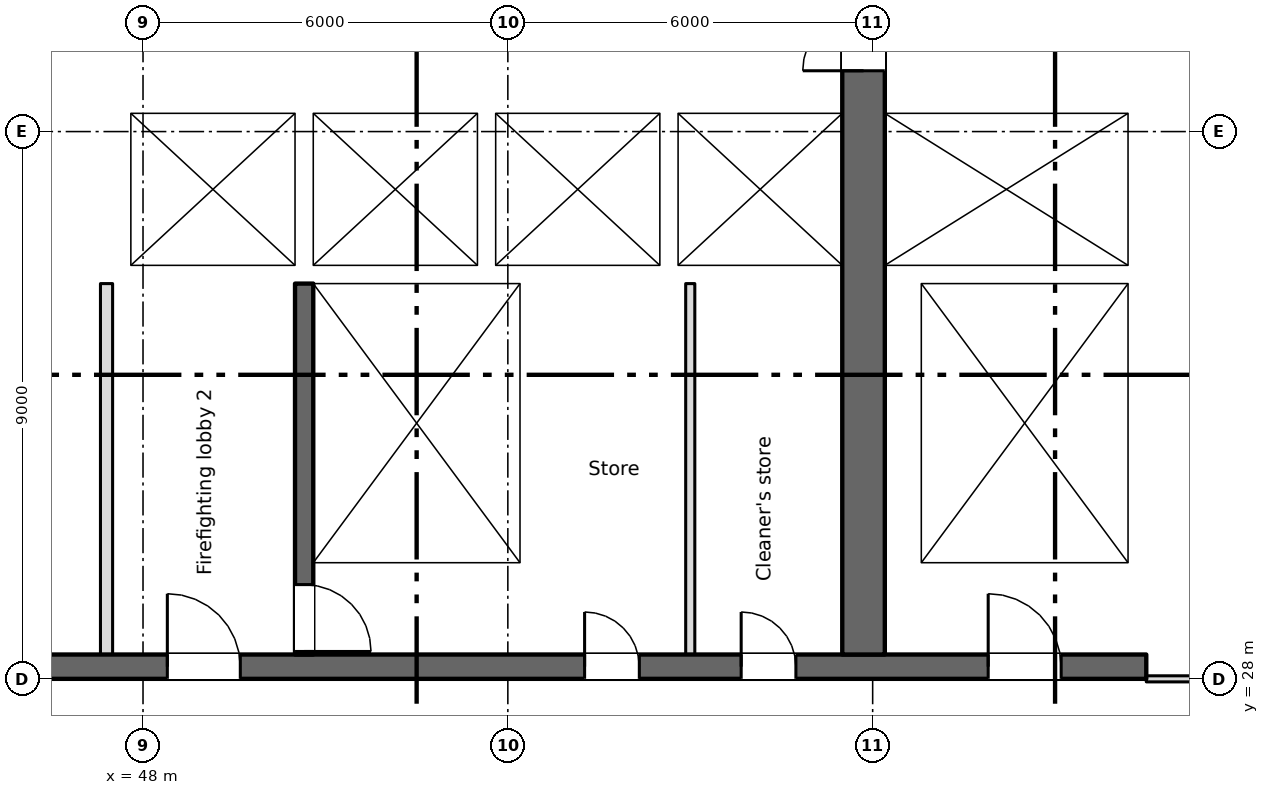
"""IFC4 building model, lengths in metres.
Left out: names, types, materials, properties, quantities, classifications, styles, units other than length and angle.
Written with IfcOpenShell. Run it as: python <this file> out.ifc"""

import sys

from ifc_helpers import new_model, si_unit, direction, frame, frame_2d, origin, place, context, subcontext, project, spatial, rectangle, extrude, element, fill, save


model = new_model("IFC4")
c1 = context("Model", 3, precision=1e-05, world=origin(), true_north=direction((0.0, 1.0)))
c2 = subcontext(c1, "Body", "Model", "MODEL_VIEW")
j1 = project(units=[si_unit("LENGTHUNIT", "METRE"), si_unit("PLANEANGLEUNIT", "RADIAN")], contexts=[c1])
p1 = place(None, origin())
s1 = spatial("IfcSite", under=j1, at=p1, CompositionType="ELEMENT")
p2 = place(p1, origin())
s2 = spatial("IfcBuilding", under=s1, at=p2, CompositionType="ELEMENT")
p3 = place(p2, frame((0.0, 0.0, 193.0)))
s3 = spatial("IfcBuildingStorey", under=s2, at=p3, CompositionType="ELEMENT", Elevation=193.0)
p4 = place(p3, frame((6.6, 28.2, 0.0), z_axis=(0.0, 0.0, 1.0), x_axis=(1.0, 0.0, 0.0)))
e1 = element("IfcWall", 1, at=p4, inside=s3, PredefinedType="SHEAR", context=c2, shape_type="SweptSolid", body=[
    extrude(rectangle(XDim=57.9, YDim=0.4, at=frame_2d((28.95, 0.0))), origin(), (0.0, 0.0, 1.0), 3.35),
])
p5 = place(p4, frame((13.95, 0.0, 0.0)))
e2 = element("IfcOpeningElement", 2, at=p5, cuts=e1, PredefinedType="OPENING", context=c2, shape_type="SweptSolid", body=[
    extrude(rectangle(XDim=0.9, YDim=2.1, at=frame_2d((0.45, 1.05))), frame((0.0, 0.21, 0.0), z_axis=(0.0, -1.0, 0.0), x_axis=(1.0, 0.0, 0.0)), (0.0, 0.0, 1.0), 0.42),
])
p6 = place(p4, frame((48.663, 0.0, 0.0)))
e3 = element("IfcOpeningElement", 3, at=p6, cuts=e1, PredefinedType="OPENING", context=c2, shape_type="SweptSolid", body=[
    extrude(rectangle(XDim=0.9, YDim=2.1, at=frame_2d((0.45, 1.05))), frame((0.0, 0.21, 0.0), z_axis=(0.0, -1.0, 0.0), x_axis=(1.0, 0.0, 0.0)), (0.0, 0.0, 1.0), 0.42),
])
p7 = place(p4, frame((51.238, 0.0, 0.0)))
e4 = element("IfcOpeningElement", 4, at=p7, cuts=e1, PredefinedType="OPENING", context=c2, shape_type="SweptSolid", body=[
    extrude(rectangle(XDim=0.9, YDim=2.1, at=frame_2d((0.45, 1.05))), frame((0.0, 0.21, 0.0), z_axis=(0.0, -1.0, 0.0), x_axis=(1.0, 0.0, 0.0)), (0.0, 0.0, 1.0), 0.42),
])
p8 = place(p4, frame((1.45, 0.0, 0.0)))
e5 = element("IfcOpeningElement", 5, at=p8, cuts=e1, PredefinedType="OPENING", context=c2, shape_type="SweptSolid", body=[
    extrude(rectangle(XDim=0.9, YDim=2.1, at=frame_2d((0.45, 1.05))), frame((0.0, 0.21, 0.0), z_axis=(0.0, -1.0, 0.0), x_axis=(1.0, 0.0, 0.0)), (0.0, 0.0, 1.0), 0.42),
])
p9 = place(p4, frame((4.8, 0.0, 0.0)))
e6 = element("IfcOpeningElement", 6, at=p9, cuts=e1, PredefinedType="OPENING", context=c2, shape_type="SweptSolid", body=[
    extrude(rectangle(XDim=1.2, YDim=2.1, at=frame_2d((0.6, 1.05))), frame((0.0, 0.21, 0.0), z_axis=(0.0, -1.0, 0.0), x_axis=(1.0, 0.0, 0.0)), (0.0, 0.0, 1.0), 0.42),
])
p10 = place(p4, frame((31.8, 0.0, 0.0)))
e7 = element("IfcOpeningElement", 7, at=p10, cuts=e1, PredefinedType="OPENING", context=c2, shape_type="SweptSolid", body=[
    extrude(rectangle(XDim=1.2, YDim=2.1, at=frame_2d((0.6, 1.05))), frame((0.0, 0.21, 0.0), z_axis=(0.0, -1.0, 0.0), x_axis=(1.0, 0.0, 0.0)), (0.0, 0.0, 1.0), 0.42),
])
p11 = place(p4, frame((55.3, 0.0, 0.0)))
e8 = element("IfcOpeningElement", 8, at=p11, cuts=e1, PredefinedType="OPENING", context=c2, shape_type="SweptSolid", body=[
    extrude(rectangle(XDim=1.2, YDim=2.1, at=frame_2d((0.6, 1.05))), frame((0.0, 0.21, 0.0), z_axis=(0.0, -1.0, 0.0), x_axis=(1.0, 0.0, 0.0)), (0.0, 0.0, 1.0), 0.42),
])
p12 = place(p4, frame((21.8, 0.0, 0.0)))
e9 = element("IfcOpeningElement", 9, at=p12, cuts=e1, PredefinedType="OPENING", context=c2, shape_type="SweptSolid", body=[
    extrude(rectangle(XDim=1.2, YDim=2.1, at=frame_2d((0.6, 1.05))), frame((0.0, 0.21, 0.0), z_axis=(0.0, -1.0, 0.0), x_axis=(1.0, 0.0, 0.0)), (0.0, 0.0, 1.0), 0.42),
])
p13 = place(p4, frame((41.8, 0.0, 0.0)))
e10 = element("IfcOpeningElement", 10, at=p13, cuts=e1, PredefinedType="OPENING", context=c2, shape_type="SweptSolid", body=[
    extrude(rectangle(XDim=1.2, YDim=2.1, at=frame_2d((0.6, 1.05))), frame((0.0, 0.21, 0.0), z_axis=(0.0, -1.0, 0.0), x_axis=(1.0, 0.0, 0.0)), (0.0, 0.0, 1.0), 0.42),
])
p14 = place(p4, frame((24.95, 0.0, 0.0)))
e11 = element("IfcOpeningElement", 11, at=p14, cuts=e1, PredefinedType="OPENING", context=c2, shape_type="SweptSolid", body=[
    extrude(rectangle(XDim=2.4, YDim=2.1, at=frame_2d((1.2, 1.05))), frame((0.0, 0.21, 0.0), z_axis=(0.0, -1.0, 0.0), x_axis=(1.0, 0.0, 0.0)), (0.0, 0.0, 1.0), 0.42),
])
p15 = place(p4, frame((37.45, 0.0, 0.0)))
e12 = element("IfcOpeningElement", 12, at=p15, cuts=e1, PredefinedType="OPENING", context=c2, shape_type="SweptSolid", body=[
    extrude(rectangle(XDim=2.4, YDim=2.1, at=frame_2d((1.2, 1.05))), frame((0.0, 0.21, 0.0), z_axis=(0.0, -1.0, 0.0), x_axis=(1.0, 0.0, 0.0)), (0.0, 0.0, 1.0), 0.42),
])
p16 = place(p4, frame((8.1, 0.0, 0.0)))
e13 = element("IfcOpeningElement", 13, at=p16, cuts=e1, PredefinedType="OPENING", context=c2, shape_type="SweptSolid", body=[
    extrude(rectangle(XDim=2.4, YDim=2.1, at=frame_2d((1.2, 1.05))), frame((0.0, 0.21, 0.0), z_axis=(0.0, -1.0, 0.0), x_axis=(1.0, 0.0, 0.0)), (0.0, 0.0, 1.0), 0.42),
])
p17 = place(p4, frame((28.95, 0.0, 0.0)))
e14 = element("IfcOpeningElement", 14, at=p17, cuts=e1, PredefinedType="OPENING", context=c2, shape_type="SweptSolid", body=[
    extrude(rectangle(XDim=0.9, YDim=2.1, at=frame_2d((0.45, 1.05))), frame((0.0, 0.21, 0.0), z_axis=(0.0, -1.0, 0.0), x_axis=(1.0, 0.0, 0.0)), (0.0, 0.0, 1.0), 0.42),
])
p18 = place(p4, frame((34.95, 0.0, 0.0)))
e15 = element("IfcOpeningElement", 15, at=p18, cuts=e1, PredefinedType="OPENING", context=c2, shape_type="SweptSolid", body=[
    extrude(rectangle(XDim=0.9, YDim=2.1, at=frame_2d((0.45, 1.05))), frame((0.0, 0.21, 0.0), z_axis=(0.0, -1.0, 0.0), x_axis=(1.0, 0.0, 0.0)), (0.0, 0.0, 1.0), 0.42),
])
p19 = place(p3, frame((64.35, 34.8, 0.0), z_axis=(0.0, 0.0, 1.0), x_axis=(0.0, 1.0, 0.0)))
e16 = element("IfcWall", 16, at=p19, inside=s3, PredefinedType="SHEAR", context=c2, shape_type="SweptSolid", body=[
    extrude(rectangle(XDim=10.5, YDim=0.3, at=frame_2d((5.25, 0.0))), origin(), (0.0, 0.0, 1.0), 3.35),
])
p20 = place(p3, frame((59.85, 28.4, 0.0), z_axis=(0.0, 0.0, 1.0), x_axis=(0.0, 1.0, 0.0)))
e17 = element("IfcWall", 17, at=p20, inside=s3, PredefinedType="SHEAR", context=c2, shape_type="SweptSolid", body=[
    extrude(rectangle(XDim=16.9, YDim=0.7, at=frame_2d((8.45, 0.0))), origin(), (0.0, 0.0, 1.0), 3.35),
])
p21 = place(p20, frame((9.6, 0.0, 0.0)))
e18 = element("IfcOpeningElement", 18, at=p21, cuts=e17, PredefinedType="OPENING", context=c2, shape_type="SweptSolid", body=[
    extrude(rectangle(XDim=2.0, YDim=2.1, at=frame_2d((1.0, 1.05))), frame((0.0, 0.36, 0.0), z_axis=(0.0, -1.0, 0.0), x_axis=(1.0, 0.0, 0.0)), (0.0, 0.0, 1.0), 0.72),
])
p22 = place(p20, frame((15.4, 0.0, 0.0)))
e19 = element("IfcOpeningElement", 19, at=p22, cuts=e17, PredefinedType="OPENING", context=c2, shape_type="SweptSolid", body=[
    extrude(rectangle(XDim=1.2, YDim=2.1, at=frame_2d((0.6, 1.05))), frame((0.0, 0.36, 0.0), z_axis=(0.0, -1.0, 0.0), x_axis=(1.0, 0.0, 0.0)), (0.0, 0.0, 1.0), 0.72),
])
p23 = place(p3, frame((50.65, 34.5, 0.0), z_axis=(0.0, 0.0, 1.0), x_axis=(0.0, -1.0, 0.0)))
e20 = element("IfcWall", 20, at=p23, inside=s3, PredefinedType="SHEAR", context=c2, shape_type="SweptSolid", body=[
    extrude(rectangle(XDim=6.1, YDim=0.3, at=frame_2d((3.05, 0.0))), origin(), (0.0, 0.0, 1.0), 3.35),
])
p24 = place(p23, frame((4.95, 0.0, 0.0)))
e21 = element("IfcOpeningElement", 21, at=p24, cuts=e20, PredefinedType="OPENING", context=c2, shape_type="SweptSolid", body=[
    extrude(rectangle(XDim=1.1, YDim=2.1, at=frame_2d((0.55, 1.05))), frame((0.0, 0.16, 0.0), z_axis=(0.0, -1.0, 0.0), x_axis=(1.0, 0.0, 0.0)), (0.0, 0.0, 1.0), 0.32),
])
p25 = place(p3, frame((54.35, 28.4, 0.0), z_axis=(0.0, 0.0, 1.0), x_axis=(0.0, 1.0, 0.0)))
e22 = element("IfcWall", 22, at=p25, inside=s3, PredefinedType="SHEAR", context=c2, shape_type="SweptSolid", body=[
    extrude(rectangle(XDim=6.1, YDim=0.3, at=frame_2d((3.05, 0.0))), origin(), (0.0, 0.0, 1.0), 3.35),
])
p26 = place(p3, frame((60.5, 28.4, 0.0), z_axis=(0.0, 0.0, 1.0), x_axis=(0.0, 1.0, 0.0)))
e23 = element("IfcWall", 23, at=p26, inside=s3, PredefinedType="SHEAR", context=c2, shape_type="SweptSolid", body=[
    extrude(rectangle(XDim=6.1, YDim=0.6, at=frame_2d((3.05, 0.0))), origin(), (0.0, 0.0, 1.0), 3.35),
])
p27 = place(p3, frame((64.35, 28.4, 0.0), z_axis=(0.0, 0.0, 1.0), x_axis=(0.0, 1.0, 0.0)))
e24 = element("IfcWall", 24, at=p27, inside=s3, PredefinedType="SHEAR", context=c2, shape_type="SweptSolid", body=[
    extrude(rectangle(XDim=6.1, YDim=0.3, at=frame_2d((3.05, 0.0))), origin(), (0.0, 0.0, 1.0), 3.35),
])
p28 = place(p3, frame((47.3, 34.65, 0.0), z_axis=(0.0, 0.0, 1.0), x_axis=(1.0, 0.0, 0.0)))
e25 = element("IfcWall", 25, at=p28, inside=s3, PredefinedType="SHEAR", context=c2, shape_type="SweptSolid", body=[
    extrude(rectangle(XDim=12.2, YDim=0.3, at=frame_2d((6.1, 0.0))), origin(), (0.0, 0.0, 1.0), 3.35),
])
p29 = place(p28, frame((1.3, 0.0, 0.0)))
e26 = element("IfcOpeningElement", 26, at=p29, cuts=e25, PredefinedType="OPENING", context=c2, shape_type="SweptSolid", body=[
    extrude(rectangle(XDim=1.1, YDim=2.1, at=frame_2d((0.55, 1.05))), frame((0.0, 0.16, 0.0), z_axis=(0.0, -1.0, 0.0), x_axis=(1.0, 0.0, 0.0)), (0.0, 0.0, 1.0), 0.32),
])
p30 = place(p3, frame((60.2, 34.65, 0.0), z_axis=(0.0, 0.0, 1.0), x_axis=(1.0, 0.0, 0.0)))
e27 = element("IfcWall", 27, at=p30, inside=s3, PredefinedType="SHEAR", context=c2, shape_type="SweptSolid", body=[
    extrude(rectangle(XDim=4.3, YDim=0.3, at=frame_2d((2.15, 0.0))), origin(), (0.0, 0.0, 1.0), 3.35),
])
p31 = place(p3, frame((47.3, 37.45, 0.0), z_axis=(0.0, 0.0, 1.0), x_axis=(1.0, 0.0, 0.0)))
e28 = element("IfcWall", 28, at=p31, inside=s3, PredefinedType="SHEAR", context=c2, shape_type="SweptSolid", body=[
    extrude(rectangle(XDim=12.2, YDim=0.3, at=frame_2d((6.1, 0.0))), origin(), (0.0, 0.0, 1.0), 3.35),
])
p32 = place(p31, frame((4.3, 0.0, 0.0)))
e29 = element("IfcOpeningElement", 29, at=p32, cuts=e28, PredefinedType="OPENING", context=c2, shape_type="SweptSolid", body=[
    extrude(rectangle(XDim=1.1, YDim=2.1, at=frame_2d((0.55, 1.05))), frame((0.0, 0.16, 0.0), z_axis=(0.0, -1.0, 0.0), x_axis=(1.0, 0.0, 0.0)), (0.0, 0.0, 1.0), 0.32),
])
p33 = place(p31, frame((7.3, 0.0, 0.0)))
e30 = element("IfcOpeningElement", 30, at=p33, cuts=e28, PredefinedType="OPENING", context=c2, shape_type="SweptSolid", body=[
    extrude(rectangle(XDim=1.1, YDim=2.1, at=frame_2d((0.55, 1.05))), frame((0.0, 0.16, 0.0), z_axis=(0.0, -1.0, 0.0), x_axis=(1.0, 0.0, 0.0)), (0.0, 0.0, 1.0), 0.32),
])
p34 = place(p31, frame((10.3, 0.0, 0.0)))
e31 = element("IfcOpeningElement", 31, at=p34, cuts=e28, PredefinedType="OPENING", context=c2, shape_type="SweptSolid", body=[
    extrude(rectangle(XDim=1.1, YDim=2.1, at=frame_2d((0.55, 1.05))), frame((0.0, 0.16, 0.0), z_axis=(0.0, -1.0, 0.0), x_axis=(1.0, 0.0, 0.0)), (0.0, 0.0, 1.0), 0.32),
])
p35 = place(p3, frame((60.2, 37.45, 0.0), z_axis=(0.0, 0.0, 1.0), x_axis=(1.0, 0.0, 0.0)))
e32 = element("IfcWall", 32, at=p35, inside=s3, PredefinedType="SHEAR", context=c2, shape_type="SweptSolid", body=[
    extrude(rectangle(XDim=4.0, YDim=0.3, at=frame_2d((2.0, 0.0))), origin(), (0.0, 0.0, 1.0), 3.35),
])
p36 = place(p35, frame((1.45, 0.0, 0.0)))
e33 = element("IfcOpeningElement", 33, at=p36, cuts=e32, PredefinedType="OPENING", context=c2, shape_type="SweptSolid", body=[
    extrude(rectangle(XDim=1.1, YDim=2.1, at=frame_2d((0.55, 1.05))), frame((0.0, 0.16, 0.0), z_axis=(0.0, -1.0, 0.0), x_axis=(1.0, 0.0, 0.0)), (0.0, 0.0, 1.0), 0.32),
])
p37 = place(p3, frame((47.55, 34.8, 0.0), z_axis=(0.0, 0.0, 1.0), x_axis=(0.0, 1.0, 0.0)))
e34 = element("IfcWall", 34, at=p37, inside=s3, PredefinedType="SHEAR", context=c2, shape_type="SweptSolid", body=[
    extrude(rectangle(XDim=2.5, YDim=0.5, at=frame_2d((1.25, 0.0))), origin(), (0.0, 0.0, 1.0), 3.35),
])
for number, where, z_axis, x_axis in (
    (35, (50.65, 34.8, 0.0), (0.0, 0.0, 1.0), (0.0, 1.0, 0.0)),
    (36, (53.65, 34.8, 0.0), (0.0, 0.0, 1.0), (0.0, 1.0, 0.0)),
    (37, (56.65, 34.8, 0.0), (0.0, 0.0, 1.0), (0.0, 1.0, 0.0)),
):
    element("IfcWall", number, at=place(p3, frame(where, z_axis=z_axis, x_axis=x_axis)), inside=s3, PredefinedType="SHEAR", context=c2, shape_type="SweptSolid", body=[
        extrude(rectangle(XDim=2.5, YDim=0.3, at=frame_2d((1.25, 0.0))), origin(), (0.0, 0.0, 1.0), 3.35),
    ])
p38 = place(p3, frame((47.4, 28.4, 0.0), z_axis=(0.0, 0.0, 1.0), x_axis=(0.0, 1.0, 0.0)))
e38 = element("IfcWall", 38, at=p38, inside=s3, PredefinedType="PARTITIONING", context=c2, shape_type="SweptSolid", body=[
    extrude(rectangle(XDim=6.1, YDim=0.2, at=frame_2d((3.05, 0.0))), origin(), (0.0, 0.0, 1.0), 3.35),
])
p39 = place(p3, frame((57.0, 28.4, 0.0), z_axis=(0.0, 0.0, 1.0), x_axis=(0.0, 1.0, 0.0)))
e39 = element("IfcWall", 39, at=p39, inside=s3, PredefinedType="PARTITIONING", context=c2, shape_type="SweptSolid", body=[
    extrude(rectangle(XDim=6.1, YDim=0.15, at=frame_2d((3.05, 0.0))), origin(), (0.0, 0.0, 1.0), 3.35),
])
p40 = place(p3, frame((64.5, 28.0, 0.0), z_axis=(0.0, 0.0, 1.0), x_axis=(1.0, 0.0, 0.0)))
e40 = element("IfcWall", 40, at=p40, inside=s3, PredefinedType="PARTITIONING", context=c2, shape_type="SweptSolid", body=[
    extrude(rectangle(XDim=6.9, YDim=0.1, at=frame_2d((3.45, 0.0))), origin(), (0.0, 0.0, 1.0), 3.35),
])
p41 = place(p40, frame((2.55, 0.0, 0.0)))
e41 = element("IfcOpeningElement", 41, at=p41, cuts=e40, PredefinedType="OPENING", context=c2, shape_type="SweptSolid", body=[
    extrude(rectangle(XDim=1.8, YDim=2.1, at=frame_2d((0.9, 1.05))), frame((0.0, 0.06, 0.0), z_axis=(0.0, -1.0, 0.0), x_axis=(1.0, 0.0, 0.0)), (0.0, 0.0, 1.0), 0.12),
])
p42 = place(p6, origin())
e42 = element("IfcDoor", 42, at=p42, inside=s3, OperationType="SINGLE_SWING_LEFT", PredefinedType="DOOR", context=c2, shape_type="SweptSolid", body=[
    extrude(rectangle(XDim=0.9, YDim=2.1, at=frame_2d((0.45, 1.05))), frame((0.0, 0.025, 0.0), z_axis=(0.0, -1.0, 0.0), x_axis=(1.0, 0.0, 0.0)), (0.0, 0.0, 1.0), 0.05),
])
fill(e3, e42)
p43 = place(p7, origin())
e43 = element("IfcDoor", 43, at=p43, inside=s3, OperationType="SINGLE_SWING_LEFT", PredefinedType="DOOR", context=c2, shape_type="SweptSolid", body=[
    extrude(rectangle(XDim=0.9, YDim=2.1, at=frame_2d((0.45, 1.05))), frame((0.0, 0.025, 0.0), z_axis=(0.0, -1.0, 0.0), x_axis=(1.0, 0.0, 0.0)), (0.0, 0.0, 1.0), 0.05),
])
fill(e4, e43)
p44 = place(p32, origin())
e44 = element("IfcDoor", 44, at=p44, inside=s3, OperationType="SLIDING_TO_LEFT", PredefinedType="DOOR", context=c2, shape_type="SweptSolid", body=[
    extrude(rectangle(XDim=1.1, YDim=2.1, at=frame_2d((0.55, 1.05))), frame((0.0, 0.025, 0.0), z_axis=(0.0, -1.0, 0.0), x_axis=(1.0, 0.0, 0.0)), (0.0, 0.0, 1.0), 0.05),
])
fill(e29, e44)
p45 = place(p33, origin())
e45 = element("IfcDoor", 45, at=p45, inside=s3, OperationType="SLIDING_TO_LEFT", PredefinedType="DOOR", context=c2, shape_type="SweptSolid", body=[
    extrude(rectangle(XDim=1.1, YDim=2.1, at=frame_2d((0.55, 1.05))), frame((0.0, 0.025, 0.0), z_axis=(0.0, -1.0, 0.0), x_axis=(1.0, 0.0, 0.0)), (0.0, 0.0, 1.0), 0.05),
])
fill(e30, e45)
p46 = place(p34, origin())
e46 = element("IfcDoor", 46, at=p46, inside=s3, OperationType="SLIDING_TO_LEFT", PredefinedType="DOOR", context=c2, shape_type="SweptSolid", body=[
    extrude(rectangle(XDim=1.1, YDim=2.1, at=frame_2d((0.55, 1.05))), frame((0.0, 0.025, 0.0), z_axis=(0.0, -1.0, 0.0), x_axis=(1.0, 0.0, 0.0)), (0.0, 0.0, 1.0), 0.05),
])
fill(e31, e46)
p47 = place(p36, origin())
e47 = element("IfcDoor", 47, at=p47, inside=s3, OperationType="SLIDING_TO_LEFT", PredefinedType="DOOR", context=c2, shape_type="SweptSolid", body=[
    extrude(rectangle(XDim=1.1, YDim=2.1, at=frame_2d((0.55, 1.05))), frame((0.0, 0.025, 0.0), z_axis=(0.0, -1.0, 0.0), x_axis=(1.0, 0.0, 0.0)), (0.0, 0.0, 1.0), 0.05),
])
fill(e33, e47)
p48 = place(p29, origin())
e48 = element("IfcDoor", 48, at=p48, inside=s3, OperationType="SLIDING_TO_LEFT", PredefinedType="DOOR", context=c2, shape_type="SweptSolid", body=[
    extrude(rectangle(XDim=1.1, YDim=2.1, at=frame_2d((0.55, 1.05))), frame((0.0, 0.025, 0.0), z_axis=(0.0, -1.0, 0.0), x_axis=(1.0, 0.0, 0.0)), (0.0, 0.0, 1.0), 0.05),
])
fill(e26, e48)
p49 = place(p24, origin())
e49 = element("IfcDoor", 49, at=p49, inside=s3, OperationType="SINGLE_SWING_RIGHT", PredefinedType="DOOR", context=c2, shape_type="SweptSolid", body=[
    extrude(rectangle(XDim=1.1, YDim=2.1, at=frame_2d((0.55, 1.05))), frame((0.0, 0.025, 0.0), z_axis=(0.0, -1.0, 0.0), x_axis=(1.0, 0.0, 0.0)), (0.0, 0.0, 1.0), 0.05),
])
fill(e21, e49)
p50 = place(p11, origin())
e50 = element("IfcDoor", 50, at=p50, inside=s3, OperationType="SINGLE_SWING_LEFT", PredefinedType="DOOR", context=c2, shape_type="SweptSolid", body=[
    extrude(rectangle(XDim=1.2, YDim=2.1, at=frame_2d((0.6, 1.05))), frame((0.0, 0.025, 0.0), z_axis=(0.0, -1.0, 0.0), x_axis=(1.0, 0.0, 0.0)), (0.0, 0.0, 1.0), 0.05),
])
fill(e8, e50)
p51 = place(p13, origin())
e51 = element("IfcDoor", 51, at=p51, inside=s3, OperationType="SINGLE_SWING_LEFT", PredefinedType="DOOR", context=c2, shape_type="SweptSolid", body=[
    extrude(rectangle(XDim=1.2, YDim=2.1, at=frame_2d((0.6, 1.05))), frame((0.0, 0.025, 0.0), z_axis=(0.0, -1.0, 0.0), x_axis=(1.0, 0.0, 0.0)), (0.0, 0.0, 1.0), 0.05),
])
fill(e10, e51)
p52 = place(p21, origin())
e52 = element("IfcDoor", 52, at=p52, inside=s3, OperationType="DOUBLE_DOOR_SINGLE_SWING", PredefinedType="DOOR", context=c2, shape_type="SweptSolid", body=[
    extrude(rectangle(XDim=2.0, YDim=2.1, at=frame_2d((1.0, 1.05))), frame((0.0, 0.025, 0.0), z_axis=(0.0, -1.0, 0.0), x_axis=(1.0, 0.0, 0.0)), (0.0, 0.0, 1.0), 0.05),
])
fill(e18, e52)
save(model, sys.argv[1])
